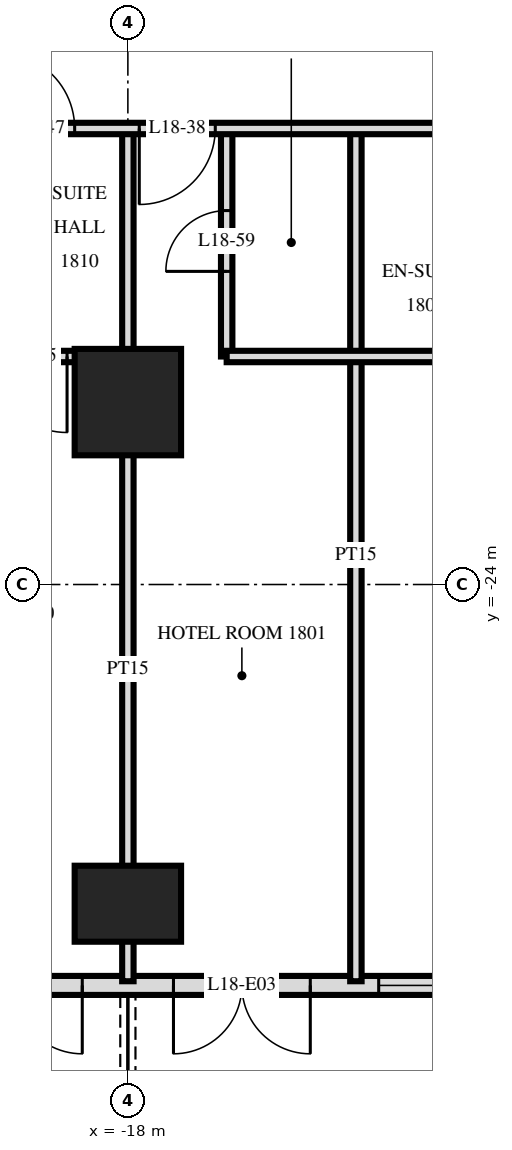
"""IFC4 building model, lengths in metres.
Left out: names, types, materials, properties, quantities, classifications, styles, units other than length and angle.
Written with IfcOpenShell. Run it as: python <this file> out.ifc"""

import sys

from ifc_helpers import new_model, si_unit, direction, frame, frame_2d, origin, origin_2d, place, context, subcontext, project, spatial, rectangle, extrude, element, fill, save


model = new_model("IFC4")
c1 = context("Model", 3, precision=1e-05, world=origin(), true_north=direction((0.0, 1.0)))
c2 = subcontext(c1, "Body", "Model", "MODEL_VIEW")
j1 = project(units=[si_unit("LENGTHUNIT", "METRE"), si_unit("PLANEANGLEUNIT", "RADIAN")], contexts=[c1])
p1 = place(None, origin())
s1 = spatial("IfcSite", under=j1, at=p1, CompositionType="ELEMENT")
p2 = place(p1, origin())
s2 = spatial("IfcBuilding", under=s1, at=p2, CompositionType="ELEMENT")
p3 = place(p2, frame((0.0, 0.0, 74.4)))
s3 = spatial("IfcBuildingStorey", under=s2, at=p3, CompositionType="ELEMENT", Elevation=74.4)
p4 = place(p3, frame((-18.0, -28.2, 0.0), z_axis=(0.0, 0.0, 1.0), x_axis=(1.0, 0.0, 0.0)))
e1 = element("IfcColumn", 1, at=p4, inside=s3, PredefinedType="COLUMN", context=c2, shape_type="SweptSolid", body=[
    extrude(rectangle(XDim=1.4, YDim=1.0, at=origin_2d()), origin(), (0.0, 0.0, 1.0), 3.6),
])
p5 = place(p3, frame((-18.0, -21.6, 0.0), z_axis=(0.0, 0.0, 1.0), x_axis=(1.0, 0.0, 0.0)))
e2 = element("IfcColumn", 2, at=p5, inside=s3, PredefinedType="COLUMN", context=c2, shape_type="SweptSolid", body=[
    extrude(rectangle(XDim=1.4, YDim=1.4, at=origin_2d()), origin(), (0.0, 0.0, 1.0), 3.6),
])
p6 = place(p3, frame((-28.775, -29.275, 0.0), z_axis=(0.0, 0.0, 1.0), x_axis=(1.0, 0.0, 0.0)))
e3 = element("IfcWall", 3, at=p6, inside=s3, PredefinedType="SOLIDWALL", context=c2, shape_type="SweptSolid", body=[
    extrude(rectangle(XDim=57.551, YDim=0.25, at=frame_2d((28.775, 0.0))), origin(), (0.0, 0.0, 1.0), 3.32),
])
p7 = place(p6, frame((0.575, 0.0, 0.0)))
e4 = element("IfcOpeningElement", 4, at=p7, cuts=e3, PredefinedType="OPENING", context=c2, shape_type="SweptSolid", body=[
    extrude(rectangle(XDim=1.8, YDim=2.4, at=frame_2d((0.9, 1.2))), frame((0.0, 0.135, 0.0), z_axis=(0.0, -1.0, 0.0), x_axis=(1.0, 0.0, 0.0)), (0.0, 0.0, 1.0), 0.27),
])
p8 = place(p6, frame((5.075, 0.0, 0.3)))
e5 = element("IfcOpeningElement", 5, at=p8, cuts=e3, PredefinedType="OPENING", context=c2, shape_type="SweptSolid", body=[
    extrude(rectangle(XDim=2.4, YDim=2.1, at=frame_2d((1.2, 1.05))), frame((0.0, 0.135, 0.0), z_axis=(0.0, -1.0, 0.0), x_axis=(1.0, 0.0, 0.0)), (0.0, 0.0, 1.0), 0.27),
])
p9 = place(p6, frame((8.375, 0.0, 0.0)))
e6 = element("IfcOpeningElement", 6, at=p9, cuts=e3, PredefinedType="OPENING", context=c2, shape_type="SweptSolid", body=[
    extrude(rectangle(XDim=1.8, YDim=2.4, at=frame_2d((0.9, 1.2))), frame((0.0, 0.135, 0.0), z_axis=(0.0, -1.0, 0.0), x_axis=(1.0, 0.0, 0.0)), (0.0, 0.0, 1.0), 0.27),
])
p10 = place(p6, frame((11.375, 0.0, 0.0)))
e7 = element("IfcOpeningElement", 7, at=p10, cuts=e3, PredefinedType="OPENING", context=c2, shape_type="SweptSolid", body=[
    extrude(rectangle(XDim=1.8, YDim=2.4, at=frame_2d((0.9, 1.2))), frame((0.0, 0.135, 0.0), z_axis=(0.0, -1.0, 0.0), x_axis=(1.0, 0.0, 0.0)), (0.0, 0.0, 1.0), 0.27),
])
p11 = place(p6, frame((14.075, 0.0, 0.3)))
e8 = element("IfcOpeningElement", 8, at=p11, cuts=e3, PredefinedType="OPENING", context=c2, shape_type="SweptSolid", body=[
    extrude(rectangle(XDim=2.4, YDim=2.1, at=frame_2d((1.2, 1.05))), frame((0.0, 0.135, 0.0), z_axis=(0.0, -1.0, 0.0), x_axis=(1.0, 0.0, 0.0)), (0.0, 0.0, 1.0), 0.27),
])
p12 = place(p6, frame((17.375, 0.0, 0.0)))
e9 = element("IfcOpeningElement", 9, at=p12, cuts=e3, PredefinedType="OPENING", context=c2, shape_type="SweptSolid", body=[
    extrude(rectangle(XDim=1.8, YDim=2.4, at=frame_2d((0.9, 1.2))), frame((0.0, 0.135, 0.0), z_axis=(0.0, -1.0, 0.0), x_axis=(1.0, 0.0, 0.0)), (0.0, 0.0, 1.0), 0.27),
])
p13 = place(p6, frame((20.075, 0.0, 0.3)))
e10 = element("IfcOpeningElement", 10, at=p13, cuts=e3, PredefinedType="OPENING", context=c2, shape_type="SweptSolid", body=[
    extrude(rectangle(XDim=2.4, YDim=2.1, at=frame_2d((1.2, 1.05))), frame((0.0, 0.135, 0.0), z_axis=(0.0, -1.0, 0.0), x_axis=(1.0, 0.0, 0.0)), (0.0, 0.0, 1.0), 0.27),
])
p14 = place(p6, frame((23.075, 0.0, 0.3)))
e11 = element("IfcOpeningElement", 11, at=p14, cuts=e3, PredefinedType="OPENING", context=c2, shape_type="SweptSolid", body=[
    extrude(rectangle(XDim=2.4, YDim=2.1, at=frame_2d((1.2, 1.05))), frame((0.0, 0.135, 0.0), z_axis=(0.0, -1.0, 0.0), x_axis=(1.0, 0.0, 0.0)), (0.0, 0.0, 1.0), 0.27),
])
p15 = place(p6, frame((26.375, 0.0, 0.0)))
e12 = element("IfcOpeningElement", 12, at=p15, cuts=e3, PredefinedType="OPENING", context=c2, shape_type="SweptSolid", body=[
    extrude(rectangle(XDim=1.8, YDim=2.4, at=frame_2d((0.9, 1.2))), frame((0.0, 0.135, 0.0), z_axis=(0.0, -1.0, 0.0), x_axis=(1.0, 0.0, 0.0)), (0.0, 0.0, 1.0), 0.27),
])
p16 = place(p6, frame((29.375, 0.0, 0.0)))
e13 = element("IfcOpeningElement", 13, at=p16, cuts=e3, PredefinedType="OPENING", context=c2, shape_type="SweptSolid", body=[
    extrude(rectangle(XDim=1.8, YDim=2.4, at=frame_2d((0.9, 1.2))), frame((0.0, 0.135, 0.0), z_axis=(0.0, -1.0, 0.0), x_axis=(1.0, 0.0, 0.0)), (0.0, 0.0, 1.0), 0.27),
])
p17 = place(p6, frame((32.075, 0.0, 0.3)))
e14 = element("IfcOpeningElement", 14, at=p17, cuts=e3, PredefinedType="OPENING", context=c2, shape_type="SweptSolid", body=[
    extrude(rectangle(XDim=2.4, YDim=2.1, at=frame_2d((1.2, 1.05))), frame((0.0, 0.135, 0.0), z_axis=(0.0, -1.0, 0.0), x_axis=(1.0, 0.0, 0.0)), (0.0, 0.0, 1.0), 0.27),
])
p18 = place(p6, frame((35.375, 0.0, 0.0)))
e15 = element("IfcOpeningElement", 15, at=p18, cuts=e3, PredefinedType="OPENING", context=c2, shape_type="SweptSolid", body=[
    extrude(rectangle(XDim=1.8, YDim=2.4, at=frame_2d((0.9, 1.2))), frame((0.0, 0.135, 0.0), z_axis=(0.0, -1.0, 0.0), x_axis=(1.0, 0.0, 0.0)), (0.0, 0.0, 1.0), 0.27),
])
p19 = place(p6, frame((38.075, 0.0, 0.3)))
e16 = element("IfcOpeningElement", 16, at=p19, cuts=e3, PredefinedType="OPENING", context=c2, shape_type="SweptSolid", body=[
    extrude(rectangle(XDim=2.4, YDim=2.1, at=frame_2d((1.2, 1.05))), frame((0.0, 0.135, 0.0), z_axis=(0.0, -1.0, 0.0), x_axis=(1.0, 0.0, 0.0)), (0.0, 0.0, 1.0), 0.27),
])
p20 = place(p6, frame((41.075, 0.0, 0.3)))
e17 = element("IfcOpeningElement", 17, at=p20, cuts=e3, PredefinedType="OPENING", context=c2, shape_type="SweptSolid", body=[
    extrude(rectangle(XDim=2.4, YDim=2.1, at=frame_2d((1.2, 1.05))), frame((0.0, 0.135, 0.0), z_axis=(0.0, -1.0, 0.0), x_axis=(1.0, 0.0, 0.0)), (0.0, 0.0, 1.0), 0.27),
])
p21 = place(p6, frame((44.375, 0.0, 0.0)))
e18 = element("IfcOpeningElement", 18, at=p21, cuts=e3, PredefinedType="OPENING", context=c2, shape_type="SweptSolid", body=[
    extrude(rectangle(XDim=1.8, YDim=2.4, at=frame_2d((0.9, 1.2))), frame((0.0, 0.135, 0.0), z_axis=(0.0, -1.0, 0.0), x_axis=(1.0, 0.0, 0.0)), (0.0, 0.0, 1.0), 0.27),
])
p22 = place(p6, frame((47.075, 0.0, 0.3)))
e19 = element("IfcOpeningElement", 19, at=p22, cuts=e3, PredefinedType="OPENING", context=c2, shape_type="SweptSolid", body=[
    extrude(rectangle(XDim=2.4, YDim=2.1, at=frame_2d((1.2, 1.05))), frame((0.0, 0.135, 0.0), z_axis=(0.0, -1.0, 0.0), x_axis=(1.0, 0.0, 0.0)), (0.0, 0.0, 1.0), 0.27),
])
p23 = place(p6, frame((50.375, 0.0, 0.0)))
e20 = element("IfcOpeningElement", 20, at=p23, cuts=e3, PredefinedType="OPENING", context=c2, shape_type="SweptSolid", body=[
    extrude(rectangle(XDim=1.8, YDim=2.4, at=frame_2d((0.9, 1.2))), frame((0.0, 0.135, 0.0), z_axis=(0.0, -1.0, 0.0), x_axis=(1.0, 0.0, 0.0)), (0.0, 0.0, 1.0), 0.27),
])
p24 = place(p6, frame((53.375, 0.0, 0.0)))
e21 = element("IfcOpeningElement", 21, at=p24, cuts=e3, PredefinedType="OPENING", context=c2, shape_type="SweptSolid", body=[
    extrude(rectangle(XDim=1.8, YDim=2.4, at=frame_2d((0.9, 1.2))), frame((0.0, 0.135, 0.0), z_axis=(0.0, -1.0, 0.0), x_axis=(1.0, 0.0, 0.0)), (0.0, 0.0, 1.0), 0.27),
])
p25 = place(p3, frame((-15.0, -29.22, 0.0), z_axis=(0.0, 0.0, 1.0), x_axis=(0.0, 1.0, 0.0)))
e22 = element("IfcWall", 22, at=p25, inside=s3, PredefinedType="PARTITIONING", context=c2, shape_type="SweptSolid", body=[
    extrude(rectangle(XDim=11.22, YDim=0.15, at=frame_2d((5.61, 0.0))), origin(), (0.0, 0.0, 1.0), 3.32),
])
p26 = place(p3, frame((-16.7, -21.0, 0.0), z_axis=(0.0, 0.0, 1.0), x_axis=(0.0, 1.0, 0.0)))
e23 = element("IfcWall", 23, at=p26, inside=s3, PredefinedType="PARTITIONING", context=c2, shape_type="SweptSolid", body=[
    extrude(rectangle(XDim=3.0, YDim=0.15, at=frame_2d((1.5, 0.0))), origin(), (0.0, 0.0, 1.0), 3.32),
])
p27 = place(p26, frame((1.12, 0.0, 0.0)))
e24 = element("IfcOpeningElement", 24, at=p27, cuts=e23, PredefinedType="OPENING", context=c2, shape_type="SweptSolid", body=[
    extrude(rectangle(XDim=0.8, YDim=2.1, at=frame_2d((0.4, 1.05))), frame((0.0, 0.085, 0.0), z_axis=(0.0, -1.0, 0.0), x_axis=(1.0, 0.0, 0.0)), (0.0, 0.0, 1.0), 0.17),
])
p28 = place(p3, frame((-18.0, -21.0, 0.0), z_axis=(0.0, 0.0, 1.0), x_axis=(0.0, 1.0, 0.0)))
e25 = element("IfcWall", 25, at=p28, inside=s3, PredefinedType="PARTITIONING", context=c2, shape_type="SweptSolid", body=[
    extrude(rectangle(XDim=3.0, YDim=0.15, at=frame_2d((1.5, 0.0))), origin(), (0.0, 0.0, 1.0), 3.32),
])
p29 = place(p3, frame((-18.0, -29.22, 0.0), z_axis=(0.0, 0.0, 1.0), x_axis=(0.0, 1.0, 0.0)))
e26 = element("IfcWall", 26, at=p29, inside=s3, PredefinedType="PARTITIONING", context=c2, shape_type="SweptSolid", body=[
    extrude(rectangle(XDim=8.22, YDim=0.15, at=frame_2d((4.11, 0.0))), origin(), (0.0, 0.0, 1.0), 3.32),
])
p30 = place(p3, frame((-20.4, -21.0, 0.0), z_axis=(0.0, 0.0, 1.0), x_axis=(1.0, 0.0, 0.0)))
e27 = element("IfcWall", 27, at=p30, inside=s3, PredefinedType="PARTITIONING", context=c2, shape_type="SweptSolid", body=[
    extrude(rectangle(XDim=2.4, YDim=0.15, at=frame_2d((1.2, 0.0))), origin(), (0.0, 0.0, 1.0), 3.32),
])
p31 = place(p30, frame((0.6, 0.0, 0.0)))
e28 = element("IfcOpeningElement", 28, at=p31, cuts=e27, PredefinedType="OPENING", context=c2, shape_type="SweptSolid", body=[
    extrude(rectangle(XDim=1.0, YDim=2.1, at=frame_2d((0.5, 1.05))), frame((0.0, 0.085, 0.0), z_axis=(0.0, -1.0, 0.0), x_axis=(1.0, 0.0, 0.0)), (0.0, 0.0, 1.0), 0.17),
])
p32 = place(p3, frame((-16.7, -21.0, 0.0), z_axis=(0.0, 0.0, 1.0), x_axis=(1.0, 0.0, 0.0)))
e29 = element("IfcWall", 29, at=p32, inside=s3, PredefinedType="PARTITIONING", context=c2, shape_type="SweptSolid", body=[
    extrude(rectangle(XDim=4.4, YDim=0.15, at=frame_2d((2.2, 0.0))), origin(), (0.0, 0.0, 1.0), 3.32),
])
p33 = place(p3, frame((-33.12, -18.0, 0.0), z_axis=(0.0, 0.0, 1.0), x_axis=(1.0, 0.0, 0.0)))
e30 = element("IfcWall", 30, at=p33, inside=s3, PredefinedType="PARTITIONING", context=c2, shape_type="SweptSolid", body=[
    extrude(rectangle(XDim=66.24, YDim=0.15, at=frame_2d((33.12, 0.0))), origin(), (0.0, 0.0, 1.0), 3.32),
])
p34 = place(p33, frame((15.27, 0.0, 0.0)))
e31 = element("IfcOpeningElement", 31, at=p34, cuts=e30, PredefinedType="OPENING", context=c2, shape_type="SweptSolid", body=[
    extrude(rectangle(XDim=1.0, YDim=2.1, at=frame_2d((0.5, 1.05))), frame((0.0, 0.085, 0.0), z_axis=(0.0, -1.0, 0.0), x_axis=(1.0, 0.0, 0.0)), (0.0, 0.0, 1.0), 0.17),
])
p35 = place(p33, frame((21.22, 0.0, 0.0)))
e32 = element("IfcOpeningElement", 32, at=p35, cuts=e30, PredefinedType="OPENING", context=c2, shape_type="SweptSolid", body=[
    extrude(rectangle(XDim=1.0, YDim=2.1, at=frame_2d((0.5, 1.05))), frame((0.0, 0.085, 0.0), z_axis=(0.0, -1.0, 0.0), x_axis=(1.0, 0.0, 0.0)), (0.0, 0.0, 1.0), 0.17),
])
p36 = place(p33, frame((24.27, 0.0, 0.0)))
e33 = element("IfcOpeningElement", 33, at=p36, cuts=e30, PredefinedType="OPENING", context=c2, shape_type="SweptSolid", body=[
    extrude(rectangle(XDim=1.0, YDim=2.1, at=frame_2d((0.5, 1.05))), frame((0.0, 0.085, 0.0), z_axis=(0.0, -1.0, 0.0), x_axis=(1.0, 0.0, 0.0)), (0.0, 0.0, 1.0), 0.17),
])
p37 = place(p33, frame((30.97, 0.0, 0.0)))
e34 = element("IfcOpeningElement", 34, at=p37, cuts=e30, PredefinedType="OPENING", context=c2, shape_type="SweptSolid", body=[
    extrude(rectangle(XDim=1.0, YDim=2.1, at=frame_2d((0.5, 1.05))), frame((0.0, 0.085, 0.0), z_axis=(0.0, -1.0, 0.0), x_axis=(1.0, 0.0, 0.0)), (0.0, 0.0, 1.0), 0.17),
])
p38 = place(p33, frame((40.42, 0.0, 0.0)))
e35 = element("IfcOpeningElement", 35, at=p38, cuts=e30, PredefinedType="OPENING", context=c2, shape_type="SweptSolid", body=[
    extrude(rectangle(XDim=1.0, YDim=2.1, at=frame_2d((0.5, 1.05))), frame((0.0, 0.085, 0.0), z_axis=(0.0, -1.0, 0.0), x_axis=(1.0, 0.0, 0.0)), (0.0, 0.0, 1.0), 0.17),
])
p39 = place(p33, frame((43.97, 0.0, 0.0)))
e36 = element("IfcOpeningElement", 36, at=p39, cuts=e30, PredefinedType="OPENING", context=c2, shape_type="SweptSolid", body=[
    extrude(rectangle(XDim=1.0, YDim=2.1, at=frame_2d((0.5, 1.05))), frame((0.0, 0.085, 0.0), z_axis=(0.0, -1.0, 0.0), x_axis=(1.0, 0.0, 0.0)), (0.0, 0.0, 1.0), 0.17),
])
p40 = place(p33, frame((45.52, 0.0, 0.0)))
e37 = element("IfcOpeningElement", 37, at=p40, cuts=e30, PredefinedType="OPENING", context=c2, shape_type="SweptSolid", body=[
    extrude(rectangle(XDim=1.0, YDim=2.1, at=frame_2d((0.5, 1.05))), frame((0.0, 0.085, 0.0), z_axis=(0.0, -1.0, 0.0), x_axis=(1.0, 0.0, 0.0)), (0.0, 0.0, 1.0), 0.17),
])
p41 = place(p33, frame((52.97, 0.0, 0.0)))
e38 = element("IfcOpeningElement", 38, at=p41, cuts=e30, PredefinedType="OPENING", context=c2, shape_type="SweptSolid", body=[
    extrude(rectangle(XDim=1.0, YDim=2.1, at=frame_2d((0.5, 1.05))), frame((0.0, 0.085, 0.0), z_axis=(0.0, -1.0, 0.0), x_axis=(1.0, 0.0, 0.0)), (0.0, 0.0, 1.0), 0.17),
])
p42 = place(p33, frame((54.27, 0.0, 0.0)))
e39 = element("IfcOpeningElement", 39, at=p42, cuts=e30, PredefinedType="OPENING", context=c2, shape_type="SweptSolid", body=[
    extrude(rectangle(XDim=1.0, YDim=2.1, at=frame_2d((0.5, 1.05))), frame((0.0, 0.085, 0.0), z_axis=(0.0, -1.0, 0.0), x_axis=(1.0, 0.0, 0.0)), (0.0, 0.0, 1.0), 0.17),
])
p43 = place(p33, frame((13.42, 0.0, 0.0)))
e40 = element("IfcOpeningElement", 40, at=p43, cuts=e30, PredefinedType="OPENING", context=c2, shape_type="SweptSolid", body=[
    extrude(rectangle(XDim=1.0, YDim=2.1, at=frame_2d((0.5, 1.05))), frame((0.0, 0.085, 0.0), z_axis=(0.0, -1.0, 0.0), x_axis=(1.0, 0.0, 0.0)), (0.0, 0.0, 1.0), 0.17),
])
p44 = place(p33, frame((60.82, 0.0, 0.0)))
e41 = element("IfcOpeningElement", 41, at=p44, cuts=e30, PredefinedType="OPENING", context=c2, shape_type="SweptSolid", body=[
    extrude(rectangle(XDim=1.0, YDim=2.1, at=frame_2d((0.5, 1.05))), frame((0.0, 0.085, 0.0), z_axis=(0.0, -1.0, 0.0), x_axis=(1.0, 0.0, 0.0)), (0.0, 0.0, 1.0), 0.17),
])
p45 = place(p9, frame((0.9, 0.0, 0.0), z_axis=(0.0, 0.0, 1.0), x_axis=(-1.0, 0.0, 0.0)))
e42 = element("IfcDoor", 42, at=p45, inside=s3, OperationType="DOUBLE_DOOR_SINGLE_SWING", PredefinedType="DOOR", context=c2, shape_type="SweptSolid", body=[
    extrude(rectangle(XDim=1.8, YDim=2.4, at=frame_2d((0.0, 1.2))), frame((0.0, -0.025, 0.0), z_axis=(0.0, 1.0, 0.0), x_axis=(-1.0, 0.0, 0.0)), (0.0, 0.0, 1.0), 0.05),
])
fill(e6, e42)
p46 = place(p10, frame((0.9, 0.0, 0.0), z_axis=(0.0, 0.0, 1.0), x_axis=(-1.0, 0.0, 0.0)))
e43 = element("IfcDoor", 43, at=p46, inside=s3, OperationType="DOUBLE_DOOR_SINGLE_SWING", PredefinedType="DOOR", context=c2, shape_type="SweptSolid", body=[
    extrude(rectangle(XDim=1.8, YDim=2.4, at=frame_2d((0.0, 1.2))), frame((0.0, -0.025, 0.0), z_axis=(0.0, 1.0, 0.0), x_axis=(-1.0, 0.0, 0.0)), (0.0, 0.0, 1.0), 0.05),
])
fill(e7, e43)
p47 = place(p11, origin())
e44 = element("IfcWindow", 44, at=p47, inside=s3, PartitioningType="SINGLE_PANEL", PredefinedType="WINDOW", context=c2, shape_type="SweptSolid", body=[
    extrude(rectangle(XDim=2.4, YDim=2.1, at=frame_2d((1.2, 1.05))), frame((0.0, 0.03, 0.0), z_axis=(0.0, -1.0, 0.0), x_axis=(1.0, 0.0, 0.0)), (0.0, 0.0, 1.0), 0.06),
])
fill(e8, e44)
p48 = place(p34, frame((0.5, 0.0, 0.0), z_axis=(0.0, 0.0, 1.0), x_axis=(-1.0, 0.0, 0.0)))
e45 = element("IfcDoor", 45, at=p48, inside=s3, OperationType="SINGLE_SWING_LEFT", PredefinedType="DOOR", context=c2, shape_type="SweptSolid", body=[
    extrude(rectangle(XDim=1.0, YDim=2.1, at=frame_2d((0.0, 1.05))), frame((0.0, -0.025, 0.0), z_axis=(0.0, 1.0, 0.0), x_axis=(-1.0, 0.0, 0.0)), (0.0, 0.0, 1.0), 0.05),
])
fill(e31, e45)
p49 = place(p43, origin())
e46 = element("IfcDoor", 46, at=p49, inside=s3, OperationType="SINGLE_SWING_RIGHT", PredefinedType="DOOR", context=c2, shape_type="SweptSolid", body=[
    extrude(rectangle(XDim=1.0, YDim=2.1, at=frame_2d((0.5, 1.05))), frame((0.0, 0.025, 0.0), z_axis=(0.0, -1.0, 0.0), x_axis=(1.0, 0.0, 0.0)), (0.0, 0.0, 1.0), 0.05),
])
fill(e40, e46)
p50 = place(p27, origin())
e47 = element("IfcDoor", 47, at=p50, inside=s3, OperationType="SINGLE_SWING_RIGHT", PredefinedType="DOOR", context=c2, shape_type="SweptSolid", body=[
    extrude(rectangle(XDim=0.8, YDim=2.1, at=frame_2d((0.4, 1.05))), frame((0.0, 0.025, 0.0), z_axis=(0.0, -1.0, 0.0), x_axis=(1.0, 0.0, 0.0)), (0.0, 0.0, 1.0), 0.05),
])
fill(e24, e47)
p51 = place(p31, frame((0.5, 0.0, 0.0), z_axis=(0.0, 0.0, 1.0), x_axis=(-1.0, 0.0, 0.0)))
e48 = element("IfcDoor", 48, at=p51, inside=s3, OperationType="SINGLE_SWING_RIGHT", PredefinedType="DOOR", context=c2, shape_type="SweptSolid", body=[
    extrude(rectangle(XDim=1.0, YDim=2.1, at=frame_2d((0.0, 1.05))), frame((0.0, -0.025, 0.0), z_axis=(0.0, 1.0, 0.0), x_axis=(-1.0, 0.0, 0.0)), (0.0, 0.0, 1.0), 0.05),
])
fill(e28, e48)
save(model, sys.argv[1])
